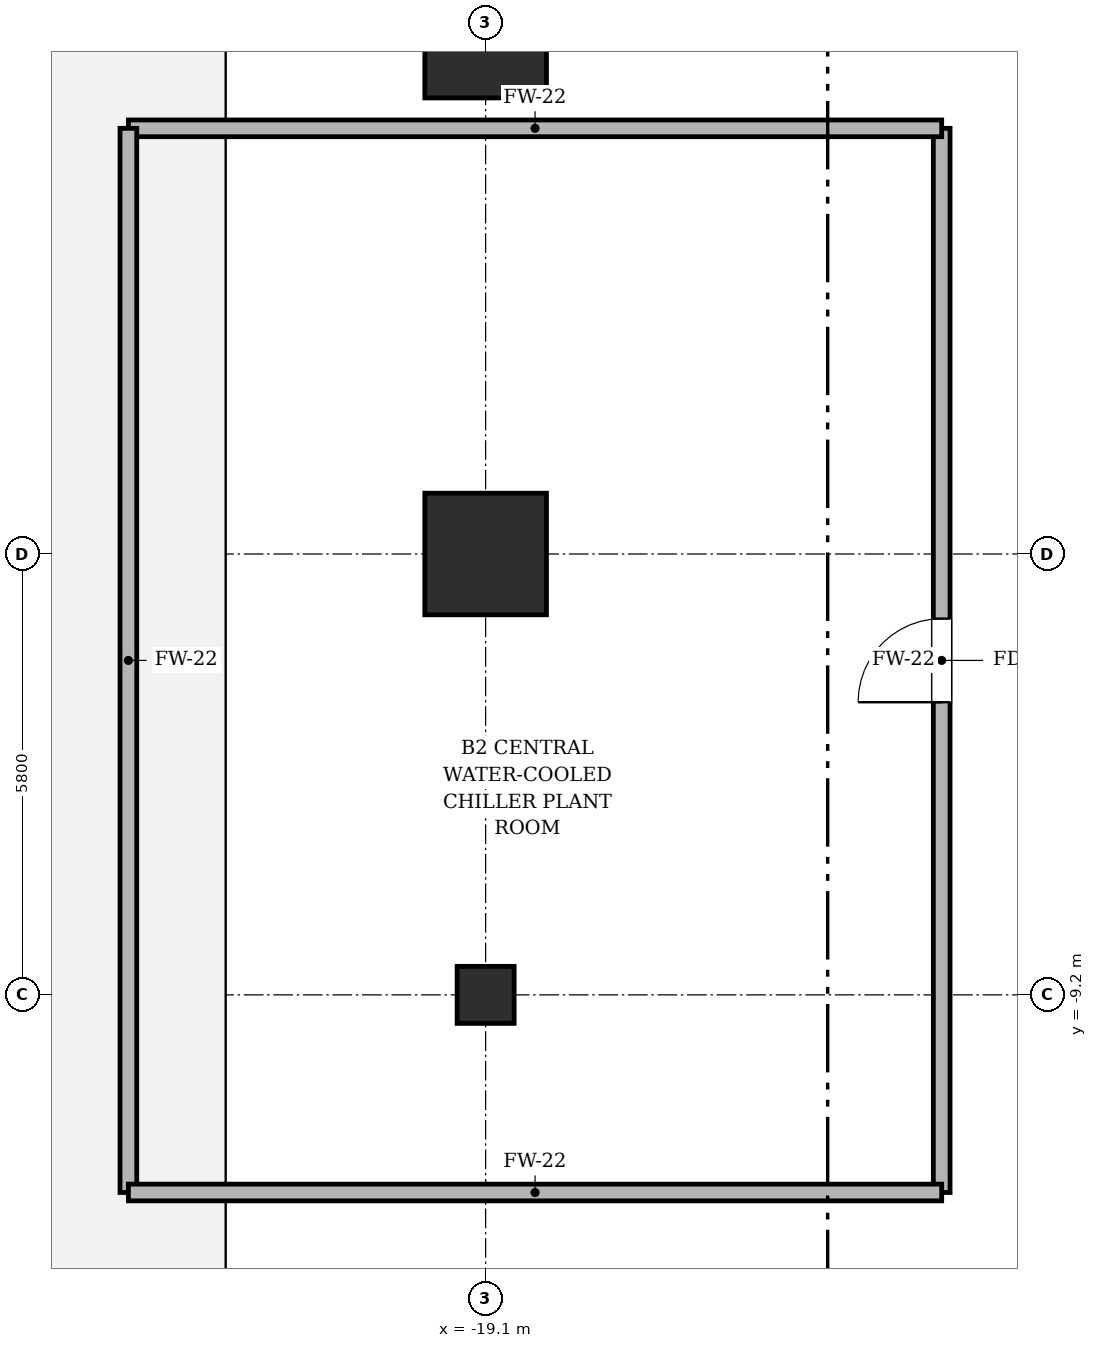
"""IFC4 building model, lengths in metres.
Left out: names, types, materials, properties, quantities, classifications, styles, units other than length and angle.
Written with IfcOpenShell. Run it as: python <this file> out.ifc"""

import sys

from ifc_helpers import new_model, si_unit, direction, frame, frame_2d, origin, origin_2d, place, context, subcontext, project, spatial, rectangle, hollow_rectangle, circle, extrude, element, fill, save


model = new_model("IFC4")
c1 = context("Model", 3, precision=1e-05, world=origin(), true_north=direction((0.0, 1.0)))
c2 = subcontext(c1, "Body", "Model", "MODEL_VIEW")
j1 = project(units=[si_unit("LENGTHUNIT", "METRE"), si_unit("PLANEANGLEUNIT", "RADIAN")], contexts=[c1])
p1 = place(None, origin())
s1 = spatial("IfcSite", under=j1, at=p1, CompositionType="ELEMENT")
p2 = place(p1, origin())
s2 = spatial("IfcBuilding", under=s1, at=p2, CompositionType="ELEMENT")
p3 = place(p2, frame((0.0, 0.0, -9.6)))
s3 = spatial("IfcBuildingStorey", under=s2, at=p3, CompositionType="ELEMENT", Elevation=-9.6)
for number, where, z_axis, x_axis in (
    (1, (-19.1, 3.4, 0.0), (0.0, 0.0, 1.0), (1.0, 0.0, 0.0)),
    (2, (-19.1, -3.4, 0.0), (0.0, 0.0, 1.0), (1.0, 0.0, 0.0)),
):
    element("IfcColumn", number, at=place(p3, frame(where, z_axis=z_axis, x_axis=x_axis)), inside=s3, PredefinedType="COLUMN", context=c2, shape_type="SweptSolid", body=[
        extrude(hollow_rectangle(XDim=1.6, YDim=1.6, WallThickness=0.05, at=origin_2d()), origin(), (0.0, 0.0, 1.0), 4.8),
    ])
p4 = place(p3, frame((-19.1, -9.2, 0.0), z_axis=(0.0, 0.0, 1.0), x_axis=(1.0, 0.0, 0.0)))
e3 = element("IfcColumn", 3, at=p4, inside=s3, PredefinedType="PILASTER", context=c2, shape_type="SweptSolid", body=[
    extrude(circle(Radius=0.375, at=origin_2d()), origin(), (0.0, 0.0, 1.0), 4.8),
])
p5 = place(p3, frame((-13.1, -11.8, 0.0), z_axis=(0.0, 0.0, 1.0), x_axis=(0.0, 1.0, 0.0)))
e4 = element("IfcWall", 4, at=p5, inside=s3, PredefinedType="SOLIDWALL", context=c2, shape_type="SweptSolid", body=[
    extrude(rectangle(XDim=14.0, YDim=0.22, at=frame_2d((7.0, 0.0))), origin(), (0.0, 0.0, 1.0), 3.814),
])
p6 = place(p5, frame((6.45, 0.0, 0.0)))
e5 = element("IfcOpeningElement", 5, at=p6, cuts=e4, PredefinedType="OPENING", context=c2, shape_type="SweptSolid", body=[
    extrude(rectangle(XDim=1.1, YDim=2.2, at=frame_2d((0.55, 1.1))), frame((0.0, 0.12, 0.0), z_axis=(0.0, -1.0, 0.0), x_axis=(1.0, 0.0, 0.0)), (0.0, 0.0, 1.0), 0.24),
])
p7 = place(p3, frame((-13.1, 2.2, 0.0), z_axis=(0.0, 0.0, 1.0), x_axis=(-1.0, 0.0, 0.0)))
e6 = element("IfcWall", 6, at=p7, inside=s3, PredefinedType="SOLIDWALL", context=c2, shape_type="SweptSolid", body=[
    extrude(rectangle(XDim=10.7, YDim=0.22, at=frame_2d((5.35, 0.0))), origin(), (0.0, 0.0, 1.0), 3.814),
])
p8 = place(p3, frame((-23.8, 2.2, 0.0), z_axis=(0.0, 0.0, 1.0), x_axis=(0.0, -1.0, 0.0)))
e7 = element("IfcWall", 7, at=p8, inside=s3, PredefinedType="SOLIDWALL", context=c2, shape_type="SweptSolid", body=[
    extrude(rectangle(XDim=14.0, YDim=0.22, at=frame_2d((7.0, 0.0))), origin(), (0.0, 0.0, 1.0), 3.814),
])
p9 = place(p3, frame((-23.8, -11.8, 0.0), z_axis=(0.0, 0.0, 1.0), x_axis=(1.0, 0.0, 0.0)))
e8 = element("IfcWall", 8, at=p9, inside=s3, PredefinedType="SOLIDWALL", context=c2, shape_type="SweptSolid", body=[
    extrude(rectangle(XDim=10.7, YDim=0.22, at=frame_2d((5.35, 0.0))), origin(), (0.0, 0.0, 1.0), 3.814),
])
p10 = place(p6, origin())
e9 = element("IfcDoor", 9, at=p10, inside=s3, OperationType="SINGLE_SWING_LEFT", PredefinedType="DOOR", context=c2, shape_type="SweptSolid", body=[
    extrude(rectangle(XDim=1.1, YDim=2.2, at=frame_2d((0.55, 1.1))), frame((0.0, 0.025, 0.0), z_axis=(0.0, -1.0, 0.0), x_axis=(1.0, 0.0, 0.0)), (0.0, 0.0, 1.0), 0.05),
])
fill(e5, e9)
save(model, sys.argv[1])
